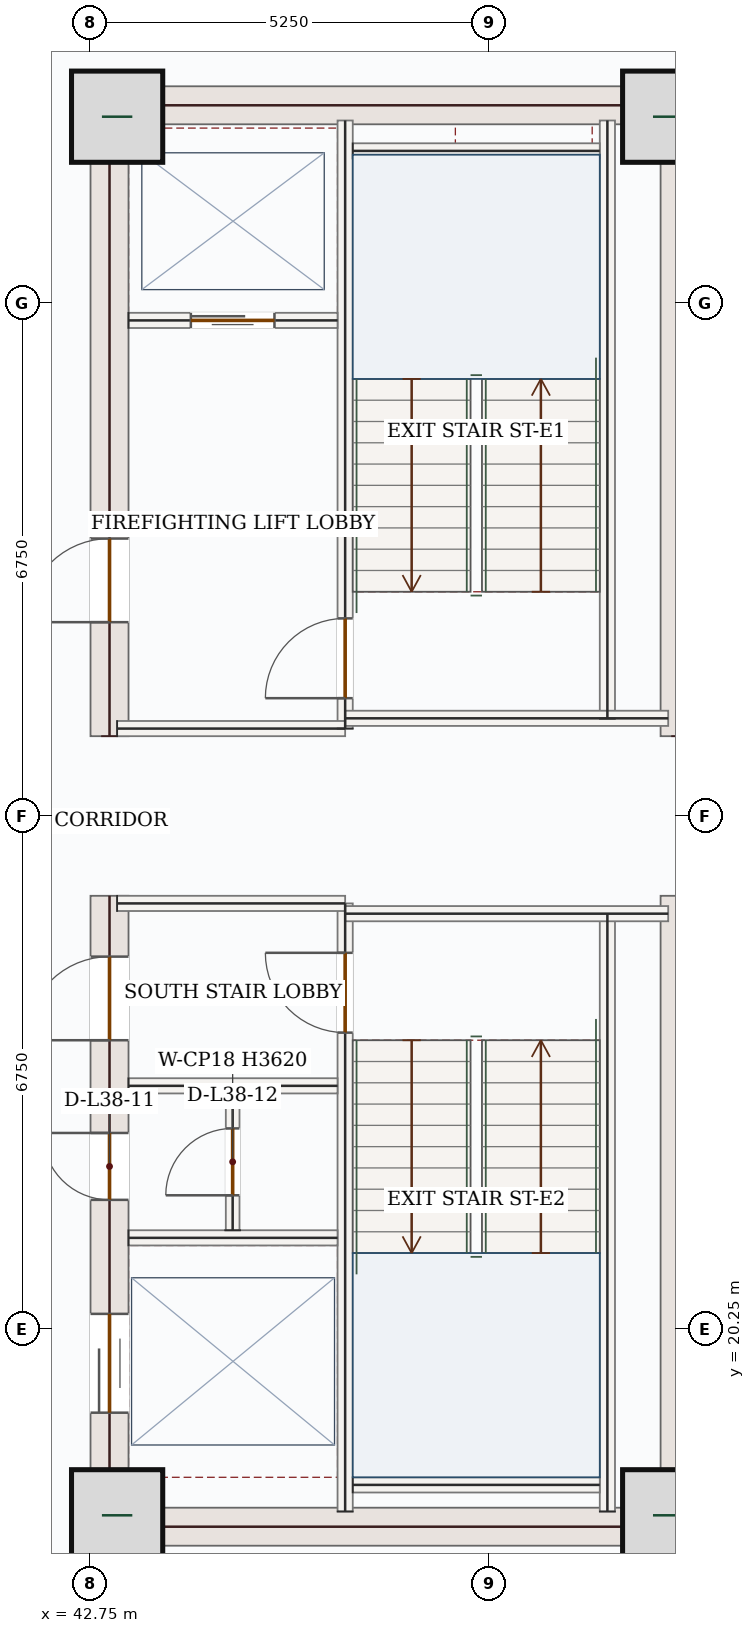
"""IFC4 building model, lengths in metres.
Left out: names, types, materials, properties, quantities, classifications, styles, units other than length and angle.
Written with IfcOpenShell. Run it as: python <this file> out.ifc"""

import sys

from ifc_helpers import new_model, si_unit, direction, frame, frame_2d, origin, origin_2d, place, context, subcontext, project, spatial, rectangle, extrude, source, transform, mapped, element, fill, save


model = new_model("IFC4")
c1 = context("Model", 3, precision=1e-05, world=origin(), true_north=direction((0.0, 1.0)))
c2 = subcontext(c1, "Body", "Model", "MODEL_VIEW")
j1 = project(units=[si_unit("LENGTHUNIT", "METRE"), si_unit("PLANEANGLEUNIT", "RADIAN")], contexts=[c1])
p1 = place(None, origin())
s1 = spatial("IfcSite", under=j1, at=p1, CompositionType="ELEMENT")
p2 = place(p1, origin())
s2 = spatial("IfcBuilding", under=s1, at=p2, CompositionType="ELEMENT")
p3 = place(p2, frame((0.0, 0.0, 166.8)))
s3 = spatial("IfcBuildingStorey", under=s2, at=p3, CompositionType="ELEMENT", Elevation=166.8)
p4 = place(p3, frame((43.0, 17.4, 0.0), z_axis=(0.0, 0.0, 1.0), x_axis=(0.0, 1.0, 0.0)))
e1 = element("IfcWall", 1, at=p4, inside=s3, PredefinedType="SHEAR", context=c2, shape_type="SweptSolid", body=[
    extrude(rectangle(XDim=8.55, YDim=0.5, at=frame_2d((4.275, 0.0))), origin(), (0.0, 0.0, 1.0), 3.62),
])
p5 = place(p4, frame((6.65, 0.0, 0.0)))
e2 = element("IfcOpeningElement", 2, at=p5, cuts=e1, PredefinedType="OPENING", context=c2, shape_type="SweptSolid", body=[
    extrude(rectangle(XDim=1.1, YDim=2.2, at=frame_2d((0.55, 1.1))), frame((0.0, 0.26, 0.0), z_axis=(0.0, -1.0, 0.0), x_axis=(1.0, 0.0, 0.0)), (0.0, 0.0, 1.0), 0.52),
])
p6 = place(p4, frame((1.75, 0.0, 0.0)))
e3 = element("IfcOpeningElement", 3, at=p6, cuts=e1, PredefinedType="OPENING", context=c2, shape_type="SweptSolid", body=[
    extrude(rectangle(XDim=1.3, YDim=2.2, at=frame_2d((0.65, 1.1))), frame((0.0, 0.26, 0.0), z_axis=(0.0, -1.0, 0.0), x_axis=(1.0, 0.0, 0.0)), (0.0, 0.0, 1.0), 0.52),
])
p7 = place(p4, frame((4.55, 0.0, 0.0)))
e4 = element("IfcOpeningElement", 4, at=p7, cuts=e1, PredefinedType="OPENING", context=c2, shape_type="SweptSolid", body=[
    extrude(rectangle(XDim=0.88, YDim=2.1, at=frame_2d((0.44, 1.05))), frame((0.0, 0.26, 0.0), z_axis=(0.0, -1.0, 0.0), x_axis=(1.0, 0.0, 0.0)), (0.0, 0.0, 1.0), 0.52),
])
p8 = place(p3, frame((43.0, 28.05, 0.0), z_axis=(0.0, 0.0, 1.0), x_axis=(0.0, 1.0, 0.0)))
e5 = element("IfcWall", 5, at=p8, inside=s3, PredefinedType="SHEAR", context=c2, shape_type="SweptSolid", body=[
    extrude(rectangle(XDim=8.55, YDim=0.5, at=frame_2d((4.275, 0.0))), origin(), (0.0, 0.0, 1.0), 3.62),
])
p9 = place(p8, frame((1.5, 0.0, 0.0)))
e6 = element("IfcOpeningElement", 6, at=p9, cuts=e5, PredefinedType="OPENING", context=c2, shape_type="SweptSolid", body=[
    extrude(rectangle(XDim=1.1, YDim=2.2, at=frame_2d((0.55, 1.1))), frame((0.0, 0.26, 0.0), z_axis=(0.0, -1.0, 0.0), x_axis=(1.0, 0.0, 0.0)), (0.0, 0.0, 1.0), 0.52),
])
m1 = source(origin(), c2, "Body", "SweptSolid", [
    extrude(rectangle(XDim=8.55, YDim=0.5, at=frame_2d((4.275, 0.0))), origin(), (0.0, 0.0, 1.0), 3.62),
])
for number, where, z_axis, x_axis in (
    (7, (50.5, 17.4, 0.0), (0.0, 0.0, 1.0), (0.0, 1.0, 0.0)),
    (8, (50.5, 28.05, 0.0), (0.0, 0.0, 1.0), (0.0, 1.0, 0.0)),
):
    element("IfcWall", number, at=place(p3, frame(where, z_axis=z_axis, x_axis=x_axis)), inside=s3, PredefinedType="SHEAR", context=c2, shape_type="MappedRepresentation", body=[
        mapped(m1, transform((0.0, 0.0, 0.0), x_axis=(1.0, 0.0, 0.0), y_axis=(0.0, 1.0, 0.0), z_axis=(0.0, 0.0, 1.0), scale=1.0)),
    ])
m2 = source(origin(), c2, "Body", "SweptSolid", [
    extrude(rectangle(XDim=7.0, YDim=0.5, at=frame_2d((3.5, 0.0))), origin(), (0.0, 0.0, 1.0), 3.62),
])
for number, where, z_axis, x_axis in (
    (9, (43.25, 17.65, 0.0), (0.0, 0.0, 1.0), (1.0, 0.0, 0.0)),
    (10, (43.25, 36.35, 0.0), (0.0, 0.0, 1.0), (1.0, 0.0, 0.0)),
):
    element("IfcWall", number, at=place(p3, frame(where, z_axis=z_axis, x_axis=x_axis)), inside=s3, PredefinedType="SHEAR", context=c2, shape_type="MappedRepresentation", body=[
        mapped(m2, transform((0.0, 0.0, 0.0), x_axis=(1.0, 0.0, 0.0), y_axis=(0.0, 1.0, 0.0), z_axis=(0.0, 0.0, 1.0), scale=1.0)),
    ])
m3 = source(origin(), c2, "Body", "SweptSolid", [
    extrude(rectangle(XDim=1.2, YDim=1.2, at=origin_2d()), origin(), (0.0, 0.0, 1.0), 3.9),
])
for number, where, z_axis, x_axis in (
    (11, (43.1, 17.8, 0.0), (0.0, 0.0, 1.0), (1.0, 0.0, 0.0)),
    (12, (50.35, 17.8, 0.0), (0.0, 0.0, 1.0), (1.0, 0.0, 0.0)),
    (13, (43.1, 36.2, 0.0), (0.0, 0.0, 1.0), (1.0, 0.0, 0.0)),
    (14, (50.35, 36.2, 0.0), (0.0, 0.0, 1.0), (1.0, 0.0, 0.0)),
):
    element("IfcColumn", number, at=place(p3, frame(where, z_axis=z_axis, x_axis=x_axis)), inside=s3, PredefinedType="COLUMN", context=c2, shape_type="MappedRepresentation", body=[
        mapped(m3, transform((0.0, 0.0, 0.0), x_axis=(1.0, 0.0, 0.0), y_axis=(0.0, 1.0, 0.0), z_axis=(0.0, 0.0, 1.0), scale=1.0)),
    ])
m4 = source(origin(), c2, "Body", "SweptSolid", [
    extrude(rectangle(XDim=5.258, YDim=0.28, at=frame_2d((2.629, 0.0))), origin(), (0.0, 0.0, 1.0), 3.62),
])
p10 = place(p3, frame((53.06, 18.458, 0.0), z_axis=(0.0, 0.0, 1.0), x_axis=(-0.707106781187, -0.707106781187, 0.0)))
e15 = element("IfcWall", 15, at=p10, inside=s3, PredefinedType="SOLIDWALL", context=c2, shape_type="MappedRepresentation", body=[
    mapped(m4, transform((0.0, 0.0, 0.0), x_axis=(1.0, 0.0, 0.0), y_axis=(0.0, 1.0, 0.0), z_axis=(0.0, 0.0, 1.0), scale=1.0)),
])
m5 = source(origin(), c2, "Body", "SweptSolid", [
    extrude(rectangle(XDim=3.129, YDim=0.28, at=frame_2d((1.565, 0.0))), origin(), (0.0, 0.0, 1.0), 3.62),
])
p11 = place(p3, frame((49.342, 39.26, 0.0), z_axis=(0.0, 0.0, 1.0), x_axis=(0.707067771627, -0.707145788594, 0.0)))
e16 = element("IfcWall", 16, at=p11, inside=s3, PredefinedType="SOLIDWALL", context=c2, shape_type="MappedRepresentation", body=[
    mapped(m5, transform((0.0, 0.0, 0.0), x_axis=(1.0, 0.0, 0.0), y_axis=(0.0, 1.0, 0.0), z_axis=(0.0, 0.0, 1.0), scale=1.0)),
])
m6 = source(origin(), c2, "Body", "SweptSolid", [
    extrude(rectangle(XDim=7.87, YDim=0.2, at=frame_2d((3.935, 0.0))), origin(), (0.0, 0.0, 1.0), 3.62),
])
for number, where, z_axis, x_axis in (
    (17, (49.55, 17.85, 0.0), (0.0, 0.0, 1.0), (0.0, 1.0, 0.0)),
    (18, (49.55, 28.28, 0.0), (0.0, 0.0, 1.0), (0.0, 1.0, 0.0)),
):
    element("IfcWall", number, at=place(p3, frame(where, z_axis=z_axis, x_axis=x_axis)), inside=s3, PredefinedType="SOLIDWALL", context=c2, shape_type="MappedRepresentation", body=[
        mapped(m6, transform((0.0, 0.0, 0.0), x_axis=(1.0, 0.0, 0.0), y_axis=(0.0, 1.0, 0.0), z_axis=(0.0, 0.0, 1.0), scale=1.0)),
    ])
p12 = place(p3, frame((46.1, 17.85, 0.0), z_axis=(0.0, 0.0, 1.0), x_axis=(0.0, 1.0, 0.0)))
e19 = element("IfcWall", 19, at=p12, inside=s3, PredefinedType="SOLIDWALL", context=c2, shape_type="SweptSolid", body=[
    extrude(rectangle(XDim=8.0, YDim=0.2, at=frame_2d((4.0, 0.0))), origin(), (0.0, 0.0, 1.0), 3.62),
])
p13 = place(p12, frame((6.3, 0.0, 0.0)))
e20 = element("IfcOpeningElement", 20, at=p13, cuts=e19, PredefinedType="OPENING", context=c2, shape_type="SweptSolid", body=[
    extrude(rectangle(XDim=1.05, YDim=2.15, at=frame_2d((0.525, 1.075))), frame((0.0, 0.11, 0.0), z_axis=(0.0, -1.0, 0.0), x_axis=(1.0, 0.0, 0.0)), (0.0, 0.0, 1.0), 0.22),
])
p14 = place(p3, frame((46.1, 28.15, 0.0), z_axis=(0.0, 0.0, 1.0), x_axis=(0.0, 1.0, 0.0)))
e21 = element("IfcWall", 21, at=p14, inside=s3, PredefinedType="SOLIDWALL", context=c2, shape_type="SweptSolid", body=[
    extrude(rectangle(XDim=8.0, YDim=0.2, at=frame_2d((4.0, 0.0))), origin(), (0.0, 0.0, 1.0), 3.62),
])
p15 = place(p14, frame((0.4, 0.0, 0.0)))
e22 = element("IfcOpeningElement", 22, at=p15, cuts=e21, PredefinedType="OPENING", context=c2, shape_type="SweptSolid", body=[
    extrude(rectangle(XDim=1.05, YDim=2.15, at=frame_2d((0.525, 1.075))), frame((0.0, 0.11, 0.0), z_axis=(0.0, -1.0, 0.0), x_axis=(1.0, 0.0, 0.0)), (0.0, 0.0, 1.0), 0.22),
])
m7 = source(origin(), c2, "Body", "SweptSolid", [
    extrude(rectangle(XDim=3.0, YDim=0.2, at=frame_2d((1.5, 0.0))), origin(), (0.0, 0.0, 1.0), 3.62),
])
p16 = place(p3, frame((43.1, 25.85, 0.0), z_axis=(0.0, 0.0, 1.0), x_axis=(1.0, 0.0, 0.0)))
e23 = element("IfcWall", 23, at=p16, inside=s3, PredefinedType="SOLIDWALL", context=c2, shape_type="MappedRepresentation", body=[
    mapped(m7, transform((0.0, 0.0, 0.0), x_axis=(1.0, 0.0, 0.0), y_axis=(0.0, 1.0, 0.0), z_axis=(0.0, 0.0, 1.0), scale=1.0)),
])
m8 = source(origin(), c2, "Body", "SweptSolid", [
    extrude(rectangle(XDim=4.25, YDim=0.2, at=frame_2d((2.125, 0.0))), origin(), (0.0, 0.0, 1.0), 3.62),
])
p17 = place(p3, frame((46.1, 25.715, 0.0), z_axis=(0.0, 0.0, 1.0), x_axis=(1.0, 0.0, 0.0)))
e24 = element("IfcWall", 24, at=p17, inside=s3, PredefinedType="SOLIDWALL", context=c2, shape_type="MappedRepresentation", body=[
    mapped(m8, transform((0.0, 0.0, 0.0), x_axis=(1.0, 0.0, 0.0), y_axis=(0.0, 1.0, 0.0), z_axis=(0.0, 0.0, 1.0), scale=1.0)),
])
p18 = place(p3, frame((43.1, 28.15, 0.0), z_axis=(0.0, 0.0, 1.0), x_axis=(1.0, 0.0, 0.0)))
e25 = element("IfcWall", 25, at=p18, inside=s3, PredefinedType="SOLIDWALL", context=c2, shape_type="MappedRepresentation", body=[
    mapped(m7, transform((0.0, 0.0, 0.0), x_axis=(1.0, 0.0, 0.0), y_axis=(0.0, 1.0, 0.0), z_axis=(0.0, 0.0, 1.0), scale=1.0)),
])
p19 = place(p3, frame((46.1, 28.285, 0.0), z_axis=(0.0, 0.0, 1.0), x_axis=(1.0, 0.0, 0.0)))
e26 = element("IfcWall", 26, at=p19, inside=s3, PredefinedType="SOLIDWALL", context=c2, shape_type="MappedRepresentation", body=[
    mapped(m8, transform((0.0, 0.0, 0.0), x_axis=(1.0, 0.0, 0.0), y_axis=(0.0, 1.0, 0.0), z_axis=(0.0, 0.0, 1.0), scale=1.0)),
])
m9 = source(origin(), c2, "Body", "SweptSolid", [
    extrude(rectangle(XDim=3.25, YDim=0.2, at=frame_2d((1.625, 0.0))), origin(), (0.0, 0.0, 1.0), 3.62),
])
for number, where, z_axis, x_axis in (
    (27, (46.2, 35.75, 0.0), (0.0, 0.0, 1.0), (1.0, 0.0, 0.0)),
    (28, (46.2, 18.2, 0.0), (0.0, 0.0, 1.0), (1.0, 0.0, 0.0)),
):
    element("IfcWall", number, at=place(p3, frame(where, z_axis=z_axis, x_axis=x_axis)), inside=s3, PredefinedType="SOLIDWALL", context=c2, shape_type="MappedRepresentation", body=[
        mapped(m9, transform((0.0, 0.0, 0.0), x_axis=(1.0, 0.0, 0.0), y_axis=(0.0, 1.0, 0.0), z_axis=(0.0, 0.0, 1.0), scale=1.0)),
    ])
p20 = place(p3, frame((43.25, 33.52, 0.0), z_axis=(0.0, 0.0, 1.0), x_axis=(1.0, 0.0, 0.0)))
e29 = element("IfcWall", 29, at=p20, inside=s3, PredefinedType="SOLIDWALL", context=c2, shape_type="SweptSolid", body=[
    extrude(rectangle(XDim=2.75, YDim=0.2, at=frame_2d((1.375, 0.0))), origin(), (0.0, 0.0, 1.0), 3.62),
])
p21 = place(p20, frame((0.82, 0.0, 0.0)))
e30 = element("IfcOpeningElement", 30, at=p21, cuts=e29, PredefinedType="OPENING", context=c2, shape_type="SweptSolid", body=[
    extrude(rectangle(XDim=1.1, YDim=2.15, at=frame_2d((0.55, 1.075))), frame((0.0, 0.11, 0.0), z_axis=(0.0, -1.0, 0.0), x_axis=(1.0, 0.0, 0.0)), (0.0, 0.0, 1.0), 0.22),
])
m10 = source(origin(), c2, "Body", "SweptSolid", [
    extrude(rectangle(XDim=2.75, YDim=0.2, at=frame_2d((1.375, 0.0))), origin(), (0.0, 0.0, 1.0), 3.62),
])
for number, where, z_axis, x_axis in (
    (31, (43.25, 23.45, 0.0), (0.0, 0.0, 1.0), (1.0, 0.0, 0.0)),
    (32, (43.25, 21.45, 0.0), (0.0, 0.0, 1.0), (1.0, 0.0, 0.0)),
):
    element("IfcWall", number, at=place(p3, frame(where, z_axis=z_axis, x_axis=x_axis)), inside=s3, PredefinedType="SOLIDWALL", context=c2, shape_type="MappedRepresentation", body=[
        mapped(m10, transform((0.0, 0.0, 0.0), x_axis=(1.0, 0.0, 0.0), y_axis=(0.0, 1.0, 0.0), z_axis=(0.0, 0.0, 1.0), scale=1.0)),
    ])
p22 = place(p3, frame((44.62, 21.55, 0.0), z_axis=(0.0, 0.0, 1.0), x_axis=(0.0, 1.0, 0.0)))
e33 = element("IfcWall", 33, at=p22, inside=s3, PredefinedType="PARTITIONING", context=c2, shape_type="SweptSolid", body=[
    extrude(rectangle(XDim=1.8, YDim=0.18, at=frame_2d((0.9, 0.0))), origin(), (0.0, 0.0, 1.0), 3.62),
])
p23 = place(p22, frame((0.46, 0.0, 0.0)))
e34 = element("IfcOpeningElement", 34, at=p23, cuts=e33, PredefinedType="OPENING", context=c2, shape_type="SweptSolid", body=[
    extrude(rectangle(XDim=0.88, YDim=2.1, at=frame_2d((0.44, 1.05))), frame((0.0, 0.1, 0.0), z_axis=(0.0, -1.0, 0.0), x_axis=(1.0, 0.0, 0.0)), (0.0, 0.0, 1.0), 0.2),
])
m11 = source(origin(), c2, "Body", "SweptSolid", [
    extrude(rectangle(XDim=1.05, YDim=2.15, at=frame_2d((0.525, 1.075))), frame((0.0, 0.025, 0.0), z_axis=(0.0, -1.0, 0.0), x_axis=(1.0, 0.0, 0.0)), (0.0, 0.0, 1.0), 0.05),
])
p24 = place(p15, origin())
e35 = element("IfcDoor", 35, at=p24, inside=s3, OperationType="SINGLE_SWING_LEFT", PredefinedType="DOOR", context=c2, shape_type="MappedRepresentation", body=[
    mapped(m11, transform((0.0, 0.0, 0.0), x_axis=(1.0, 0.0, 0.0), y_axis=(0.0, 1.0, 0.0), z_axis=(0.0, 0.0, 1.0), scale=1.0)),
])
fill(e22, e35)
p25 = place(p13, origin())
e36 = element("IfcDoor", 36, at=p25, inside=s3, OperationType="SINGLE_SWING_RIGHT", PredefinedType="DOOR", context=c2, shape_type="MappedRepresentation", body=[
    mapped(m11, transform((0.0, 0.0, 0.0), x_axis=(1.0, 0.0, 0.0), y_axis=(0.0, 1.0, 0.0), z_axis=(0.0, 0.0, 1.0), scale=1.0)),
])
fill(e20, e36)
m12 = source(origin(), c2, "Body", "SweptSolid", [
    extrude(rectangle(XDim=1.1, YDim=2.15, at=frame_2d((0.55, 1.075))), frame((0.0, 0.025, 0.0), z_axis=(0.0, -1.0, 0.0), x_axis=(1.0, 0.0, 0.0)), (0.0, 0.0, 1.0), 0.05),
])
p26 = place(p21, origin())
e37 = element("IfcDoor", 37, at=p26, inside=s3, OperationType="DOUBLE_DOOR_SLIDING", PredefinedType="DOOR", context=c2, shape_type="MappedRepresentation", body=[
    mapped(m12, transform((0.0, 0.0, 0.0), x_axis=(1.0, 0.0, 0.0), y_axis=(0.0, 1.0, 0.0), z_axis=(0.0, 0.0, 1.0), scale=1.0)),
])
fill(e30, e37)
m13 = source(origin(), c2, "Body", "SweptSolid", [
    extrude(rectangle(XDim=1.1, YDim=2.2, at=frame_2d((0.55, 1.1))), frame((0.0, 0.025, 0.0), z_axis=(0.0, -1.0, 0.0), x_axis=(1.0, 0.0, 0.0)), (0.0, 0.0, 1.0), 0.05),
])
p27 = place(p9, origin())
e38 = element("IfcDoor", 38, at=p27, inside=s3, OperationType="SINGLE_SWING_LEFT", PredefinedType="DOOR", context=c2, shape_type="MappedRepresentation", body=[
    mapped(m13, transform((0.0, 0.0, 0.0), x_axis=(1.0, 0.0, 0.0), y_axis=(0.0, 1.0, 0.0), z_axis=(0.0, 0.0, 1.0), scale=1.0)),
])
fill(e6, e38)
p28 = place(p5, origin())
e39 = element("IfcDoor", 39, at=p28, inside=s3, OperationType="SINGLE_SWING_LEFT", PredefinedType="DOOR", context=c2, shape_type="MappedRepresentation", body=[
    mapped(m13, transform((0.0, 0.0, 0.0), x_axis=(1.0, 0.0, 0.0), y_axis=(0.0, 1.0, 0.0), z_axis=(0.0, 0.0, 1.0), scale=1.0)),
])
fill(e2, e39)
m14 = source(origin(), c2, "Body", "SweptSolid", [
    extrude(rectangle(XDim=1.3, YDim=2.2, at=frame_2d((0.65, 1.1))), frame((0.0, 0.025, 0.0), z_axis=(0.0, -1.0, 0.0), x_axis=(1.0, 0.0, 0.0)), (0.0, 0.0, 1.0), 0.05),
])
p29 = place(p6, origin())
e40 = element("IfcDoor", 40, at=p29, inside=s3, OperationType="DOUBLE_DOOR_SLIDING", PredefinedType="DOOR", context=c2, shape_type="MappedRepresentation", body=[
    mapped(m14, transform((0.0, 0.0, 0.0), x_axis=(1.0, 0.0, 0.0), y_axis=(0.0, 1.0, 0.0), z_axis=(0.0, 0.0, 1.0), scale=1.0)),
])
fill(e3, e40)
m15 = source(origin(), c2, "Body", "SweptSolid", [
    extrude(rectangle(XDim=0.88, YDim=2.1, at=frame_2d((0.44, 1.05))), frame((0.0, 0.025, 0.0), z_axis=(0.0, -1.0, 0.0), x_axis=(1.0, 0.0, 0.0)), (0.0, 0.0, 1.0), 0.05),
])
p30 = place(p7, origin())
e41 = element("IfcDoor", 41, at=p30, inside=s3, OperationType="SINGLE_SWING_RIGHT", PredefinedType="DOOR", context=c2, shape_type="MappedRepresentation", body=[
    mapped(m15, transform((0.0, 0.0, 0.0), x_axis=(1.0, 0.0, 0.0), y_axis=(0.0, 1.0, 0.0), z_axis=(0.0, 0.0, 1.0), scale=1.0)),
])
fill(e4, e41)
p31 = place(p23, origin())
e42 = element("IfcDoor", 42, at=p31, inside=s3, OperationType="SINGLE_SWING_LEFT", PredefinedType="DOOR", context=c2, shape_type="MappedRepresentation", body=[
    mapped(m15, transform((0.0, 0.0, 0.0), x_axis=(1.0, 0.0, 0.0), y_axis=(0.0, 1.0, 0.0), z_axis=(0.0, 0.0, 1.0), scale=1.0)),
])
fill(e34, e42)
save(model, sys.argv[1])
